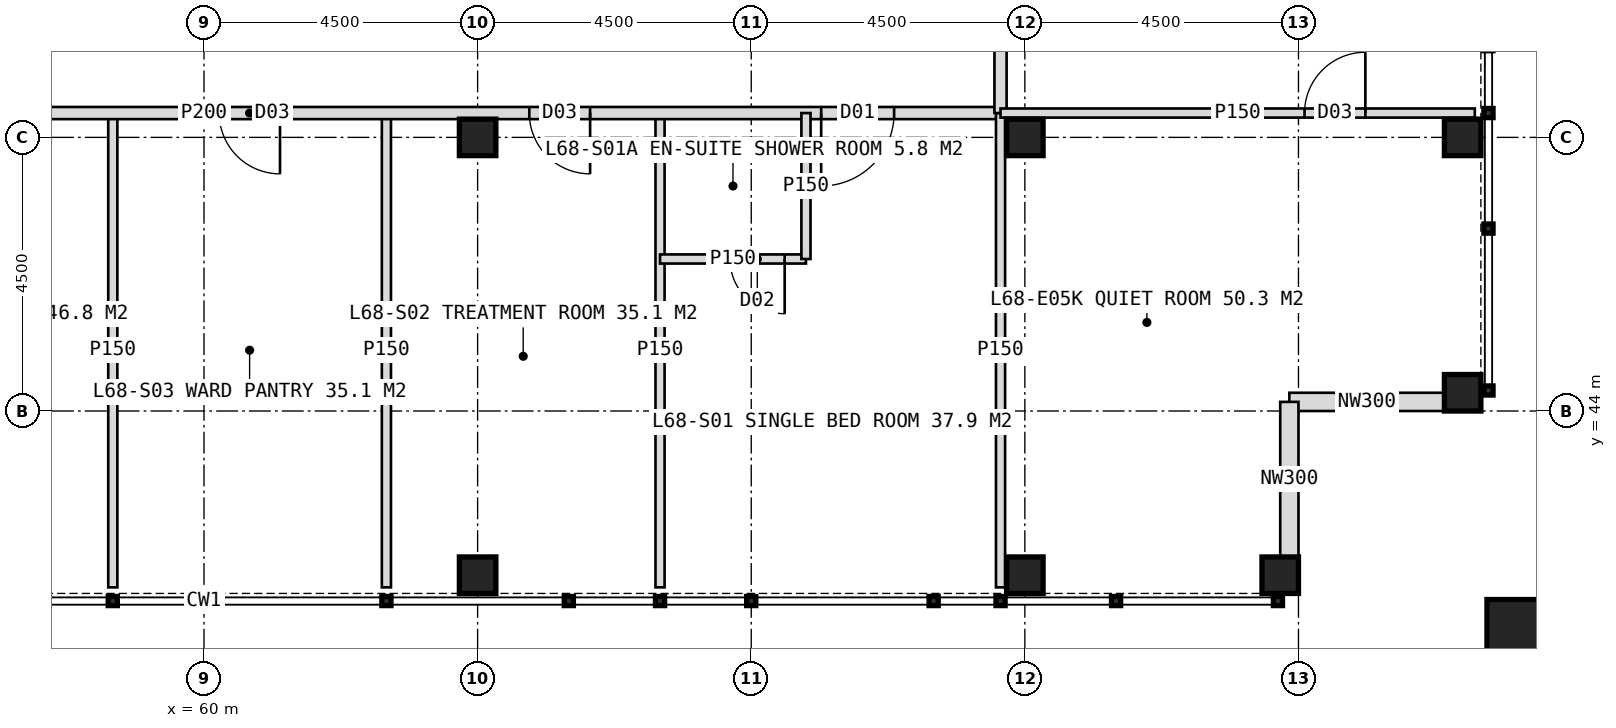
"""IFC4 building model, lengths in metres.
Left out: names, types, materials, properties, quantities, classifications, styles, units other than length and angle.
Written with IfcOpenShell. Run it as: python <this file> out.ifc"""

import sys

from ifc_helpers import new_model, si_unit, direction, frame, frame_2d, origin, origin_2d, place, context, subcontext, project, spatial, rectangle, hollow_rectangle, extrude, element, fill, save


model = new_model("IFC4")
c1 = context("Model", 3, precision=1e-05, world=origin(), true_north=direction((0.0, 1.0)))
c2 = subcontext(c1, "Body", "Model", "MODEL_VIEW")
j1 = project(units=[si_unit("LENGTHUNIT", "METRE"), si_unit("PLANEANGLEUNIT", "RADIAN")], contexts=[c1])
p1 = place(None, origin())
s1 = spatial("IfcSite", under=j1, at=p1, CompositionType="ELEMENT")
p2 = place(p1, origin())
s2 = spatial("IfcBuilding", under=s1, at=p2, CompositionType="ELEMENT")
p3 = place(p2, frame((0.0, 0.0, 282.0)))
s3 = spatial("IfcBuildingStorey", under=s2, at=p3, CompositionType="ELEMENT", Elevation=282.0)
for number, where, z_axis, x_axis in (
    (1, (73.5, 48.5, 0.0), (0.0, 0.0, 1.0), (1.0, 0.0, 0.0)),
    (2, (64.5, 48.5, 0.0), (0.0, 0.0, 1.0), (1.0, 0.0, 0.0)),
    (3, (80.7, 44.3, 0.0), (0.0, 0.0, 1.0), (1.0, 0.0, 0.0)),
    (4, (80.7, 48.5, 0.0), (0.0, 0.0, 1.0), (1.0, 0.0, 0.0)),
    (5, (64.5, 41.3, 0.0), (0.0, 0.0, 1.0), (1.0, 0.0, 0.0)),
    (6, (73.5, 41.3, 0.0), (0.0, 0.0, 1.0), (1.0, 0.0, 0.0)),
    (7, (77.7, 41.3, 0.0), (0.0, 0.0, 1.0), (1.0, 0.0, 0.0)),
):
    element("IfcColumn", number, at=place(p3, frame(where, z_axis=z_axis, x_axis=x_axis)), inside=s3, PredefinedType="COLUMN", context=c2, shape_type="SweptSolid", body=[
        extrude(hollow_rectangle(XDim=0.6, YDim=0.6, WallThickness=0.04, at=origin_2d()), origin(), (0.0, 0.0, 1.0), 4.0),
    ])
p4 = place(p3, frame((81.6, 40.4, 0.0), z_axis=(0.0, 0.0, 1.0), x_axis=(1.0, 0.0, 0.0)))
e8 = element("IfcColumn", 8, at=p4, inside=s3, PredefinedType="COLUMN", context=c2, shape_type="SweptSolid", body=[
    extrude(hollow_rectangle(XDim=1.0, YDim=1.0, WallThickness=0.06, at=origin_2d()), origin(), (0.0, 0.0, 1.0), 4.0),
])
for number, where, z_axis, x_axis in (
    (9, (80.4, 44.15, 0.0), (0.0, 0.0, 1.0), (-1.0, 0.0, 0.0)),
    (10, (77.85, 44.15, 0.0), (0.0, 0.0, 1.0), (0.0, -1.0, 0.0)),
):
    element("IfcWall", number, at=place(p3, frame(where, z_axis=z_axis, x_axis=x_axis)), inside=s3, PredefinedType="ELEMENTEDWALL", context=c2, shape_type="SweptSolid", body=[
        extrude(rectangle(XDim=2.55, YDim=0.3, at=frame_2d((1.275, 0.0))), origin(), (0.0, 0.0, 1.0), 2.95),
    ])
for number, where, z_axis, x_axis in (
    (11, (67.5, 48.9, 0.0), (0.0, 0.0, 1.0), (0.0, -1.0, 0.0)),
    (12, (63.0, 48.9, 0.0), (0.0, 0.0, 1.0), (0.0, -1.0, 0.0)),
    (13, (58.5, 48.9, 0.0), (0.0, 0.0, 1.0), (0.0, -1.0, 0.0)),
):
    element("IfcWall", number, at=place(p3, frame(where, z_axis=z_axis, x_axis=x_axis)), inside=s3, PredefinedType="PARTITIONING", context=c2, shape_type="SweptSolid", body=[
        extrude(rectangle(XDim=7.8, YDim=0.15, at=frame_2d((3.9, 0.0))), origin(), (0.0, 0.0, 1.0), 3.75),
    ])
p5 = place(p3, frame((73.1, 48.9, 0.0), z_axis=(0.0, 0.0, 1.0), x_axis=(-1.0, 0.0, 0.0)))
e14 = element("IfcWall", 14, at=p5, inside=s3, PredefinedType="PARTITIONING", context=c2, shape_type="SweptSolid", body=[
    extrude(rectangle(XDim=26.2, YDim=0.2, at=frame_2d((13.1, 0.0))), origin(), (0.0, 0.0, 1.0), 3.75),
])
p6 = place(p5, frame((1.75, 0.0, 0.0)))
e15 = element("IfcOpeningElement", 15, at=p6, cuts=e14, PredefinedType="OPENING", context=c2, shape_type="SweptSolid", body=[
    extrude(rectangle(XDim=1.2, YDim=2.2, at=frame_2d((0.6, 1.1))), frame((0.0, 0.11, 0.0), z_axis=(0.0, -1.0, 0.0), x_axis=(1.0, 0.0, 0.0)), (0.0, 0.0, 1.0), 0.22),
])
p7 = place(p5, frame((6.75, 0.0, 0.0)))
e16 = element("IfcOpeningElement", 16, at=p7, cuts=e14, PredefinedType="OPENING", context=c2, shape_type="SweptSolid", body=[
    extrude(rectangle(XDim=1.0, YDim=2.1, at=frame_2d((0.5, 1.05))), frame((0.0, 0.11, 0.0), z_axis=(0.0, -1.0, 0.0), x_axis=(1.0, 0.0, 0.0)), (0.0, 0.0, 1.0), 0.22),
])
p8 = place(p5, frame((11.85, 0.0, 0.0)))
e17 = element("IfcOpeningElement", 17, at=p8, cuts=e14, PredefinedType="OPENING", context=c2, shape_type="SweptSolid", body=[
    extrude(rectangle(XDim=1.0, YDim=2.1, at=frame_2d((0.5, 1.05))), frame((0.0, 0.11, 0.0), z_axis=(0.0, -1.0, 0.0), x_axis=(1.0, 0.0, 0.0)), (0.0, 0.0, 1.0), 0.22),
])
p9 = place(p5, frame((15.75, 0.0, 0.0)))
e18 = element("IfcOpeningElement", 18, at=p9, cuts=e14, PredefinedType="OPENING", context=c2, shape_type="SweptSolid", body=[
    extrude(rectangle(XDim=1.0, YDim=2.1, at=frame_2d((0.5, 1.05))), frame((0.0, 0.11, 0.0), z_axis=(0.0, -1.0, 0.0), x_axis=(1.0, 0.0, 0.0)), (0.0, 0.0, 1.0), 0.22),
])
p10 = place(p5, frame((23.25, 0.0, 0.0)))
e19 = element("IfcOpeningElement", 19, at=p10, cuts=e14, PredefinedType="OPENING", context=c2, shape_type="SweptSolid", body=[
    extrude(rectangle(XDim=1.2, YDim=2.2, at=frame_2d((0.6, 1.1))), frame((0.0, 0.11, 0.0), z_axis=(0.0, -1.0, 0.0), x_axis=(1.0, 0.0, 0.0)), (0.0, 0.0, 1.0), 0.22),
])
p11 = place(p3, frame((73.1, 48.9, 0.0), z_axis=(0.0, 0.0, 1.0), x_axis=(0.0, -1.0, 0.0)))
e20 = element("IfcWall", 20, at=p11, inside=s3, PredefinedType="PARTITIONING", context=c2, shape_type="SweptSolid", body=[
    extrude(rectangle(XDim=7.8, YDim=0.15, at=frame_2d((3.9, 0.0))), origin(), (0.0, 0.0, 1.0), 3.75),
])
p12 = place(p3, frame((69.9, 46.5, 0.0), z_axis=(0.0, 0.0, 1.0), x_axis=(-1.0, 0.0, 0.0)))
e21 = element("IfcWall", 21, at=p12, inside=s3, PredefinedType="PARTITIONING", context=c2, shape_type="SweptSolid", body=[
    extrude(rectangle(XDim=2.4, YDim=0.15, at=frame_2d((1.2, 0.0))), origin(), (0.0, 0.0, 1.0), 3.75),
])
p13 = place(p12, frame((0.35, 0.0, 0.0)))
e22 = element("IfcOpeningElement", 22, at=p13, cuts=e21, PredefinedType="OPENING", context=c2, shape_type="SweptSolid", body=[
    extrude(rectangle(XDim=0.9, YDim=2.1, at=frame_2d((0.45, 1.05))), frame((0.0, 0.085, 0.0), z_axis=(0.0, -1.0, 0.0), x_axis=(1.0, 0.0, 0.0)), (0.0, 0.0, 1.0), 0.17),
])
p14 = place(p3, frame((69.9, 48.9, 0.0), z_axis=(0.0, 0.0, 1.0), x_axis=(0.0, -1.0, 0.0)))
e23 = element("IfcWall", 23, at=p14, inside=s3, PredefinedType="PARTITIONING", context=c2, shape_type="SweptSolid", body=[
    extrude(rectangle(XDim=2.4, YDim=0.15, at=frame_2d((1.2, 0.0))), origin(), (0.0, 0.0, 1.0), 3.75),
])
p15 = place(p3, frame((73.1, 71.0, 0.0), z_axis=(0.0, 0.0, 1.0), x_axis=(0.0, -1.0, 0.0)))
e24 = element("IfcWall", 24, at=p15, inside=s3, PredefinedType="PARTITIONING", context=c2, shape_type="SweptSolid", body=[
    extrude(rectangle(XDim=22.1, YDim=0.2, at=frame_2d((11.05, 0.0))), origin(), (0.0, 0.0, 1.0), 3.75),
])
p16 = place(p15, frame((2.5, 0.0, 0.0)))
e25 = element("IfcOpeningElement", 25, at=p16, cuts=e24, PredefinedType="OPENING", context=c2, shape_type="SweptSolid", body=[
    extrude(rectangle(XDim=1.0, YDim=2.1, at=frame_2d((0.5, 1.05))), frame((0.0, 0.11, 0.0), z_axis=(0.0, -1.0, 0.0), x_axis=(1.0, 0.0, 0.0)), (0.0, 0.0, 1.0), 0.22),
])
p17 = place(p15, frame((7.0, 0.0, 0.0)))
e26 = element("IfcOpeningElement", 26, at=p17, cuts=e24, PredefinedType="OPENING", context=c2, shape_type="SweptSolid", body=[
    extrude(rectangle(XDim=1.0, YDim=2.1, at=frame_2d((0.5, 1.05))), frame((0.0, 0.11, 0.0), z_axis=(0.0, -1.0, 0.0), x_axis=(1.0, 0.0, 0.0)), (0.0, 0.0, 1.0), 0.22),
])
p18 = place(p15, frame((9.75, 0.0, 0.0)))
e27 = element("IfcOpeningElement", 27, at=p18, cuts=e24, PredefinedType="OPENING", context=c2, shape_type="SweptSolid", body=[
    extrude(rectangle(XDim=0.9, YDim=2.1, at=frame_2d((0.45, 1.05))), frame((0.0, 0.11, 0.0), z_axis=(0.0, -1.0, 0.0), x_axis=(1.0, 0.0, 0.0)), (0.0, 0.0, 1.0), 0.22),
])
p19 = place(p15, frame((11.65, 0.0, 0.0)))
e28 = element("IfcOpeningElement", 28, at=p19, cuts=e24, PredefinedType="OPENING", context=c2, shape_type="SweptSolid", body=[
    extrude(rectangle(XDim=1.0, YDim=2.1, at=frame_2d((0.5, 1.05))), frame((0.0, 0.11, 0.0), z_axis=(0.0, -1.0, 0.0), x_axis=(1.0, 0.0, 0.0)), (0.0, 0.0, 1.0), 0.22),
])
p20 = place(p15, frame((18.8, 0.0, 0.0)))
e29 = element("IfcOpeningElement", 29, at=p20, cuts=e24, PredefinedType="OPENING", context=c2, shape_type="SweptSolid", body=[
    extrude(rectangle(XDim=1.0, YDim=2.1, at=frame_2d((0.5, 1.05))), frame((0.0, 0.11, 0.0), z_axis=(0.0, -1.0, 0.0), x_axis=(1.0, 0.0, 0.0)), (0.0, 0.0, 1.0), 0.22),
])
p21 = place(p3, frame((73.1, 48.9, 0.0), z_axis=(0.0, 0.0, 1.0), x_axis=(1.0, 0.0, 0.0)))
e30 = element("IfcWall", 30, at=p21, inside=s3, PredefinedType="PARTITIONING", context=c2, shape_type="SweptSolid", body=[
    extrude(rectangle(XDim=7.8, YDim=0.15, at=frame_2d((3.9, 0.0))), origin(), (0.0, 0.0, 1.0), 3.75),
])
p22 = place(p21, frame((5.0, 0.0, 0.0)))
e31 = element("IfcOpeningElement", 31, at=p22, cuts=e30, PredefinedType="OPENING", context=c2, shape_type="SweptSolid", body=[
    extrude(rectangle(XDim=1.0, YDim=2.1, at=frame_2d((0.5, 1.05))), frame((0.0, 0.085, 0.0), z_axis=(0.0, -1.0, 0.0), x_axis=(1.0, 0.0, 0.0)), (0.0, 0.0, 1.0), 0.17),
])
p23 = place(p6, origin())
e32 = element("IfcDoor", 32, at=p23, inside=s3, OperationType="SINGLE_SWING_RIGHT", PredefinedType="DOOR", context=c2, shape_type="SweptSolid", body=[
    extrude(rectangle(XDim=1.2, YDim=2.2, at=frame_2d((0.6, 1.1))), frame((0.0, 0.025, 0.0), z_axis=(0.0, -1.0, 0.0), x_axis=(1.0, 0.0, 0.0)), (0.0, 0.0, 1.0), 0.05),
])
fill(e15, e32)
p24 = place(p13, origin())
e33 = element("IfcDoor", 33, at=p24, inside=s3, OperationType="SINGLE_SWING_LEFT", PredefinedType="DOOR", context=c2, shape_type="SweptSolid", body=[
    extrude(rectangle(XDim=0.9, YDim=2.1, at=frame_2d((0.45, 1.05))), frame((0.0, 0.025, 0.0), z_axis=(0.0, -1.0, 0.0), x_axis=(1.0, 0.0, 0.0)), (0.0, 0.0, 1.0), 0.05),
])
fill(e22, e33)
p25 = place(p7, origin())
e34 = element("IfcDoor", 34, at=p25, inside=s3, OperationType="SINGLE_SWING_LEFT", PredefinedType="DOOR", context=c2, shape_type="SweptSolid", body=[
    extrude(rectangle(XDim=1.0, YDim=2.1, at=frame_2d((0.5, 1.05))), frame((0.0, 0.025, 0.0), z_axis=(0.0, -1.0, 0.0), x_axis=(1.0, 0.0, 0.0)), (0.0, 0.0, 1.0), 0.05),
])
fill(e16, e34)
p26 = place(p8, origin())
e35 = element("IfcDoor", 35, at=p26, inside=s3, OperationType="SINGLE_SWING_LEFT", PredefinedType="DOOR", context=c2, shape_type="SweptSolid", body=[
    extrude(rectangle(XDim=1.0, YDim=2.1, at=frame_2d((0.5, 1.05))), frame((0.0, 0.025, 0.0), z_axis=(0.0, -1.0, 0.0), x_axis=(1.0, 0.0, 0.0)), (0.0, 0.0, 1.0), 0.05),
])
fill(e17, e35)
p27 = place(p22, origin())
e36 = element("IfcDoor", 36, at=p27, inside=s3, OperationType="SINGLE_SWING_RIGHT", PredefinedType="DOOR", context=c2, shape_type="SweptSolid", body=[
    extrude(rectangle(XDim=1.0, YDim=2.1, at=frame_2d((0.5, 1.05))), frame((0.0, 0.025, 0.0), z_axis=(0.0, -1.0, 0.0), x_axis=(1.0, 0.0, 0.0)), (0.0, 0.0, 1.0), 0.05),
])
fill(e31, e36)
save(model, sys.argv[1])
